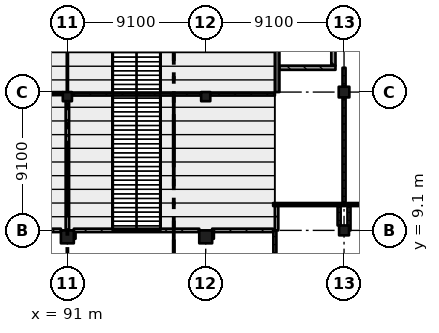
"""IFC4 building model, lengths in metres.
Left out: names, types, materials, properties, quantities, classifications, styles, units other than length and angle.
Written with IfcOpenShell. Run it as: python <this file> out.ifc"""

import sys

from ifc_helpers import new_model, si_unit, direction, frame, frame_2d, origin, origin_2d, place, context, subcontext, project, spatial, rectangle, extrude, element, fill, save


model = new_model("IFC4")
c1 = context("Model", 3, precision=1e-05, world=origin(), true_north=direction((0.0, 1.0)))
c2 = subcontext(c1, "Body", "Model", "MODEL_VIEW")
j1 = project(units=[si_unit("LENGTHUNIT", "METRE"), si_unit("PLANEANGLEUNIT", "RADIAN")], contexts=[c1])
p1 = place(None, origin())
s1 = spatial("IfcSite", under=j1, at=p1, CompositionType="ELEMENT")
p2 = place(p1, origin())
s2 = spatial("IfcBuilding", under=s1, at=p2, CompositionType="ELEMENT")
p3 = place(p2, frame((0.0, 0.0, 15.47)))
s3 = spatial("IfcBuildingStorey", under=s2, at=p3, CompositionType="ELEMENT", Elevation=15.47)
p4 = place(p3, frame((91.0, 8.675, 0.0), z_axis=(0.0, 0.0, 1.0), x_axis=(1.0, 0.0, 0.0)))
e1 = element("IfcColumn", 1, at=p4, inside=s3, PredefinedType="COLUMN", context=c2, shape_type="SweptSolid", body=[
    extrude(rectangle(XDim=0.85, YDim=0.85, at=origin_2d()), origin(), (0.0, 0.0, 1.0), 4.55),
])
p5 = place(p3, frame((91.0, 17.9, 0.0), z_axis=(0.0, 0.0, 1.0), x_axis=(1.0, 0.0, 0.0)))
e2 = element("IfcColumn", 2, at=p5, inside=s3, PredefinedType="COLUMN", context=c2, shape_type="SweptSolid", body=[
    extrude(rectangle(XDim=0.6, YDim=0.6, at=origin_2d()), origin(), (0.0, 0.0, 1.0), 2.71),
])
p6 = place(p3, frame((100.1, 8.675, 0.0), z_axis=(0.0, 0.0, 1.0), x_axis=(1.0, 0.0, 0.0)))
e3 = element("IfcColumn", 3, at=p6, inside=s3, PredefinedType="COLUMN", context=c2, shape_type="SweptSolid", body=[
    extrude(rectangle(XDim=0.85, YDim=0.85, at=origin_2d()), origin(), (0.0, 0.0, 1.0), 4.55),
])
p7 = place(p3, frame((100.1, 17.9, 0.0), z_axis=(0.0, 0.0, 1.0), x_axis=(1.0, 0.0, 0.0)))
e4 = element("IfcColumn", 4, at=p7, inside=s3, PredefinedType="COLUMN", context=c2, shape_type="SweptSolid", body=[
    extrude(rectangle(XDim=0.6, YDim=0.6, at=origin_2d()), origin(), (0.0, 0.0, 1.0), 2.71),
])
p8 = place(p3, frame((109.2, 9.1, 0.0), z_axis=(0.0, 0.0, 1.0), x_axis=(1.0, 0.0, 0.0)))
e5 = element("IfcColumn", 5, at=p8, inside=s3, PredefinedType="COLUMN", context=c2, shape_type="SweptSolid", body=[
    extrude(rectangle(XDim=0.65, YDim=0.65, at=origin_2d()), origin(), (0.0, 0.0, 1.0), 4.55),
])
p9 = place(p3, frame((109.2, 18.2, 0.0), z_axis=(0.0, 0.0, 1.0), x_axis=(1.0, 0.0, 0.0)))
e6 = element("IfcColumn", 6, at=p9, inside=s3, PredefinedType="COLUMN", context=c2, shape_type="SweptSolid", body=[
    extrude(rectangle(XDim=0.7, YDim=0.7, at=origin_2d()), origin(), (0.0, 0.0, 1.0), 4.55),
])
p10 = place(p3, frame((104.8, 40.95, 0.0), z_axis=(0.0, 0.0, 1.0), x_axis=(0.0, -1.0, 0.0)))
e7 = element("IfcWall", 7, at=p10, inside=s3, PredefinedType="SHEAR", context=c2, shape_type="SweptSolid", body=[
    extrude(rectangle(XDim=22.75, YDim=0.3, at=frame_2d((11.375, 0.0))), origin(), (0.0, 0.0, 1.0), 4.55),
])
p11 = place(p3, frame((82.325, 9.1, 0.0), z_axis=(0.0, 0.0, 1.0), x_axis=(1.0, 0.0, 0.0)))
e8 = element("IfcWall", 8, at=p11, inside=s3, PredefinedType="PARTITIONING", context=c2, shape_type="SweptSolid", body=[
    extrude(rectangle(XDim=8.25, YDim=0.225, at=frame_2d((4.125, 0.0))), origin(), (0.0, 0.0, 1.0), 3.6),
])
p12 = place(p11, frame((3.65, 0.0, 0.0)))
e9 = element("IfcOpeningElement", 9, at=p12, cuts=e8, PredefinedType="OPENING", context=c2, shape_type="SweptSolid", body=[
    extrude(rectangle(XDim=1.0, YDim=2.4, at=frame_2d((0.5, 1.2))), frame((0.0, 0.123, 0.0), z_axis=(0.0, -1.0, 0.0), x_axis=(1.0, 0.0, 0.0)), (0.0, 0.0, 1.0), 0.245),
])
p13 = place(p3, frame((91.0, 10.87, 0.0), z_axis=(0.0, 0.0, 1.0), x_axis=(0.0, -1.0, 0.0)))
e10 = element("IfcWall", 10, at=p13, inside=s3, PredefinedType="PARTITIONING", context=c2, shape_type="SweptSolid", body=[
    extrude(rectangle(XDim=1.77, YDim=0.225, at=frame_2d((0.885, 0.0))), origin(), (0.0, 0.0, 1.0), 3.22),
])
p14 = place(p3, frame((91.0, 17.6, 0.0), z_axis=(0.0, 0.0, 1.0), x_axis=(0.0, -1.0, 0.0)))
e11 = element("IfcWall", 11, at=p14, inside=s3, PredefinedType="PARTITIONING", context=c2, shape_type="SweptSolid", body=[
    extrude(rectangle(XDim=6.67, YDim=0.225, at=frame_2d((3.335, 0.0))), origin(), (0.0, 0.0, 1.0), 3.22),
])
p15 = place(p3, frame((91.425, 8.55, 0.0), z_axis=(0.0, 0.0, 1.0), x_axis=(0.0, 1.0, 0.0)))
e12 = element("IfcWall", 12, at=p15, inside=s3, PredefinedType="PARTITIONING", context=c2, shape_type="SweptSolid", body=[
    extrude(rectangle(XDim=0.425, YDim=0.225, at=frame_2d((0.212, 0.0))), origin(), (0.0, 0.0, 1.0), 4.3),
])
p16 = place(p3, frame((91.425, 9.1, 0.0), z_axis=(0.0, 0.0, 1.0), x_axis=(1.0, 0.0, 0.0)))
e13 = element("IfcWall", 13, at=p16, inside=s3, PredefinedType="PARTITIONING", context=c2, shape_type="SweptSolid", body=[
    extrude(rectangle(XDim=8.25, YDim=0.225, at=frame_2d((4.125, 0.0))), origin(), (0.0, 0.0, 1.0), 3.6),
])
p17 = place(p16, frame((3.65, 0.0, 0.0)))
e14 = element("IfcOpeningElement", 14, at=p17, cuts=e13, PredefinedType="OPENING", context=c2, shape_type="SweptSolid", body=[
    extrude(rectangle(XDim=1.0, YDim=2.4, at=frame_2d((0.5, 1.2))), frame((0.0, 0.123, 0.0), z_axis=(0.0, -1.0, 0.0), x_axis=(1.0, 0.0, 0.0)), (0.0, 0.0, 1.0), 0.245),
])
p18 = place(p3, frame((100.525, 8.55, 0.0), z_axis=(0.0, 0.0, 1.0), x_axis=(0.0, 1.0, 0.0)))
e15 = element("IfcWall", 15, at=p18, inside=s3, PredefinedType="PARTITIONING", context=c2, shape_type="SweptSolid", body=[
    extrude(rectangle(XDim=0.425, YDim=0.225, at=frame_2d((0.212, 0.0))), origin(), (0.0, 0.0, 1.0), 4.3),
])
p19 = place(p3, frame((100.525, 9.1, 0.0), z_axis=(0.0, 0.0, 1.0), x_axis=(1.0, 0.0, 0.0)))
e16 = element("IfcWall", 16, at=p19, inside=s3, PredefinedType="PARTITIONING", context=c2, shape_type="SweptSolid", body=[
    extrude(rectangle(XDim=4.013, YDim=0.225, at=frame_2d((2.006, 0.0))), origin(), (0.0, 0.0, 1.0), 3.6),
])
p20 = place(p3, frame((104.65, 5.5, 0.0), z_axis=(0.0, 0.0, 1.0), x_axis=(0.0, 1.0, 0.0)))
e17 = element("IfcWall", 17, at=p20, inside=s3, PredefinedType="PARTITIONING", context=c2, shape_type="SweptSolid", body=[
    extrude(rectangle(XDim=3.6, YDim=0.2, at=frame_2d((1.8, 0.0))), origin(), (0.0, 0.0, 1.0), 3.7),
])
p21 = place(p20, frame((0.55, 0.0, 0.0)))
e18 = element("IfcOpeningElement", 18, at=p21, cuts=e17, PredefinedType="OPENING", context=c2, shape_type="SweptSolid", body=[
    extrude(rectangle(XDim=2.4, YDim=2.4, at=frame_2d((1.2, 1.2))), frame((0.0, 0.11, 0.0), z_axis=(0.0, -1.0, 0.0), x_axis=(1.0, 0.0, 0.0)), (0.0, 0.0, 1.0), 0.22),
])
p22 = place(p3, frame((104.763, 9.1, 0.0), z_axis=(0.0, 0.0, 1.0), x_axis=(0.0, 1.0, 0.0)))
e19 = element("IfcWall", 19, at=p22, inside=s3, PredefinedType="PARTITIONING", context=c2, shape_type="SweptSolid", body=[
    extrude(rectangle(XDim=1.6, YDim=0.225, at=frame_2d((0.8, 0.0))), origin(), (0.0, 0.0, 1.0), 4.3),
])
p23 = place(p3, frame((104.95, 19.8, 0.0), z_axis=(0.0, 0.0, 1.0), x_axis=(1.0, 0.0, 0.0)))
e20 = element("IfcWall", 20, at=p23, inside=s3, PredefinedType="SOLIDWALL", context=c2, shape_type="SweptSolid", body=[
    extrude(rectangle(XDim=3.688, YDim=0.275, at=frame_2d((1.844, 0.0))), origin(), (0.0, 0.0, 1.0), 4.3),
])
p24 = place(p23, frame((1.25, 0.0, 0.0)))
e21 = element("IfcOpeningElement", 21, at=p24, cuts=e20, PredefinedType="OPENING", context=c2, shape_type="SweptSolid", body=[
    extrude(rectangle(XDim=1.2, YDim=2.4, at=frame_2d((0.6, 1.2))), frame((0.0, 0.147, 0.0), z_axis=(0.0, -1.0, 0.0), x_axis=(1.0, 0.0, 0.0)), (0.0, 0.0, 1.0), 0.295),
])
p25 = place(p3, frame((108.5, 19.938, 0.0), z_axis=(0.0, 0.0, 1.0), x_axis=(0.0, 1.0, 0.0)))
e22 = element("IfcWall", 22, at=p25, inside=s3, PredefinedType="SOLIDWALL", context=c2, shape_type="SweptSolid", body=[
    extrude(rectangle(XDim=6.9, YDim=0.275, at=frame_2d((3.45, 0.0))), origin(), (0.0, 0.0, 1.0), 4.3),
])
p26 = place(p3, frame((108.875, 9.425, 0.0), z_axis=(0.0, 0.0, 1.0), x_axis=(0.0, 1.0, 0.0)))
e23 = element("IfcWall", 23, at=p26, inside=s3, PredefinedType="PARTITIONING", context=c2, shape_type="SweptSolid", body=[
    extrude(rectangle(XDim=1.275, YDim=0.2, at=frame_2d((0.637, 0.0))), origin(), (0.0, 0.0, 1.0), 4.3),
])
p27 = place(p3, frame((104.538, 10.8, 0.0), z_axis=(0.0, 0.0, 1.0), x_axis=(1.0, 0.0, 0.0)))
e24 = element("IfcWall", 24, at=p27, inside=s3, PredefinedType="PARTITIONING", context=c2, shape_type="SweptSolid", body=[
    extrude(rectangle(XDim=4.762, YDim=0.2, at=frame_2d((2.381, 0.0))), origin(), (0.0, 0.0, 1.0), 4.3),
])
p28 = place(p27, frame((1.288, 0.0, 0.0)))
e25 = element("IfcOpeningElement", 25, at=p28, cuts=e24, PredefinedType="OPENING", context=c2, shape_type="SweptSolid", body=[
    extrude(rectangle(XDim=1.8, YDim=2.4, at=frame_2d((0.9, 1.2))), frame((0.0, 0.11, 0.0), z_axis=(0.0, -1.0, 0.0), x_axis=(1.0, 0.0, 0.0)), (0.0, 0.0, 1.0), 0.22),
])
p29 = place(p3, frame((109.2, 10.9, 0.0), z_axis=(0.0, 0.0, 1.0), x_axis=(0.0, 1.0, 0.0)))
e26 = element("IfcWall", 26, at=p29, inside=s3, PredefinedType="PARTITIONING", context=c2, shape_type="SweptSolid", body=[
    extrude(rectangle(XDim=6.95, YDim=0.2, at=frame_2d((3.475, 0.0))), origin(), (0.0, 0.0, 1.0), 3.55),
])
p30 = place(p29, frame((0.85, 0.0, 0.0)))
e27 = element("IfcOpeningElement", 27, at=p30, cuts=e26, PredefinedType="OPENING", context=c2, shape_type="SweptSolid", body=[
    extrude(rectangle(XDim=1.8, YDim=2.4, at=frame_2d((0.9, 1.2))), frame((0.0, 0.11, 0.0), z_axis=(0.0, -1.0, 0.0), x_axis=(1.0, 0.0, 0.0)), (0.0, 0.0, 1.0), 0.22),
])
p31 = place(p29, frame((4.35, 0.0, 0.0)))
e28 = element("IfcOpeningElement", 28, at=p31, cuts=e26, PredefinedType="OPENING", context=c2, shape_type="SweptSolid", body=[
    extrude(rectangle(XDim=1.8, YDim=2.4, at=frame_2d((0.9, 1.2))), frame((0.0, 0.11, 0.0), z_axis=(0.0, -1.0, 0.0), x_axis=(1.0, 0.0, 0.0)), (0.0, 0.0, 1.0), 0.22),
])
p32 = place(p3, frame((109.2, 18.55, 0.0), z_axis=(0.0, 0.0, 1.0), x_axis=(0.0, 1.0, 0.0)))
e29 = element("IfcWall", 29, at=p32, inside=s3, PredefinedType="PARTITIONING", context=c2, shape_type="SweptSolid", body=[
    extrude(rectangle(XDim=1.25, YDim=0.2, at=frame_2d((0.625, 0.0))), origin(), (0.0, 0.0, 1.0), 3.55),
])
p33 = place(p3, frame((109.525, 9.1, 0.0), z_axis=(0.0, 0.0, 1.0), x_axis=(0.0, 1.0, 0.0)))
e30 = element("IfcWall", 30, at=p33, inside=s3, PredefinedType="PARTITIONING", context=c2, shape_type="SweptSolid", body=[
    extrude(rectangle(XDim=1.6, YDim=0.2, at=frame_2d((0.8, 0.0))), origin(), (0.0, 0.0, 1.0), 4.3),
])
p34 = place(p3, frame((112.17, 10.8, 0.0), z_axis=(0.0, 0.0, 1.0), x_axis=(-1.0, 0.0, 0.0)))
e31 = element("IfcWall", 31, at=p34, inside=s3, PredefinedType="PARTITIONING", context=c2, shape_type="SweptSolid", body=[
    extrude(rectangle(XDim=2.745, YDim=0.2, at=frame_2d((1.373, 0.0))), origin(), (0.0, 0.0, 1.0), 4.3),
])
p35 = place(p34, frame((0.45, 0.0, 0.0)))
e32 = element("IfcOpeningElement", 32, at=p35, cuts=e31, PredefinedType="OPENING", context=c2, shape_type="SweptSolid", body=[
    extrude(rectangle(XDim=1.8, YDim=2.4, at=frame_2d((0.9, 1.2))), frame((0.0, 0.11, 0.0), z_axis=(0.0, -1.0, 0.0), x_axis=(1.0, 0.0, 0.0)), (0.0, 0.0, 1.0), 0.22),
])
p36 = place(p3, frame((82.2, 18.071, 0.0), z_axis=(0.0, 0.0, 1.0), x_axis=(0.999994544879, 0.003303061025, 0.0)))
e33 = element("IfcWall", 33, at=p36, inside=s3, PredefinedType="PARTITIONING", context=c2, shape_type="SweptSolid", body=[
    extrude(rectangle(XDim=8.5, YDim=0.2, at=frame_2d((4.25, 0.0))), origin(), (0.0, 0.0, 1.0), 2.71),
])
p37 = place(p36, frame((1.25, 0.0, 1.1)))
e34 = element("IfcOpeningElement", 34, at=p37, cuts=e33, PredefinedType="OPENING", context=c2, shape_type="SweptSolid", body=[
    extrude(rectangle(XDim=6.0, YDim=1.3, at=frame_2d((3.0, 0.65))), frame((0.0, 0.11, 0.0), z_axis=(0.0, -1.0, 0.0), x_axis=(1.0, 0.0, 0.0)), (0.0, 0.0, 1.0), 0.22),
])
p38 = place(p3, frame((91.3, 18.07, 0.0), z_axis=(0.0, 0.0, 1.0), x_axis=(1.0, 0.0, 0.0)))
e35 = element("IfcWall", 35, at=p38, inside=s3, PredefinedType="PARTITIONING", context=c2, shape_type="SweptSolid", body=[
    extrude(rectangle(XDim=8.5, YDim=0.2, at=frame_2d((4.25, 0.0))), origin(), (0.0, 0.0, 1.0), 2.71),
])
p39 = place(p38, frame((1.25, 0.0, 1.1)))
e36 = element("IfcOpeningElement", 36, at=p39, cuts=e35, PredefinedType="OPENING", context=c2, shape_type="SweptSolid", body=[
    extrude(rectangle(XDim=6.0, YDim=1.3, at=frame_2d((3.0, 0.65))), frame((0.0, 0.11, 0.0), z_axis=(0.0, -1.0, 0.0), x_axis=(1.0, 0.0, 0.0)), (0.0, 0.0, 1.0), 0.22),
])
p40 = place(p3, frame((100.4, 18.07, 0.0), z_axis=(0.0, 0.0, 1.0), x_axis=(1.0, 0.0, 0.0)))
e37 = element("IfcWall", 37, at=p40, inside=s3, PredefinedType="PARTITIONING", context=c2, shape_type="SweptSolid", body=[
    extrude(rectangle(XDim=4.25, YDim=0.2, at=frame_2d((2.125, 0.0))), origin(), (0.0, 0.0, 1.0), 2.91),
])
p41 = place(p40, frame((1.125, 0.0, 1.1)))
e38 = element("IfcOpeningElement", 38, at=p41, cuts=e37, PredefinedType="OPENING", context=c2, shape_type="SweptSolid", body=[
    extrude(rectangle(XDim=2.0, YDim=1.3, at=frame_2d((1.0, 0.65))), frame((0.0, 0.11, 0.0), z_axis=(0.0, -1.0, 0.0), x_axis=(1.0, 0.0, 0.0)), (0.0, 0.0, 1.0), 0.22),
])
p42 = place(p39, origin())
e39 = element("IfcWindow", 39, at=p42, inside=s3, PartitioningType="SINGLE_PANEL", PredefinedType="WINDOW", context=c2, shape_type="SweptSolid", body=[
    extrude(rectangle(XDim=6.0, YDim=1.3, at=frame_2d((3.0, 0.65))), frame((0.0, 0.03, 0.0), z_axis=(0.0, -1.0, 0.0), x_axis=(1.0, 0.0, 0.0)), (0.0, 0.0, 1.0), 0.06),
])
fill(e36, e39)
p43 = place(p41, origin())
e40 = element("IfcWindow", 40, at=p43, inside=s3, PartitioningType="SINGLE_PANEL", PredefinedType="WINDOW", context=c2, shape_type="SweptSolid", body=[
    extrude(rectangle(XDim=2.0, YDim=1.3, at=frame_2d((1.0, 0.65))), frame((0.0, 0.03, 0.0), z_axis=(0.0, -1.0, 0.0), x_axis=(1.0, 0.0, 0.0)), (0.0, 0.0, 1.0), 0.06),
])
fill(e38, e40)
p44 = place(p24, origin())
e41 = element("IfcDoor", 41, at=p44, inside=s3, OperationType="SINGLE_SWING_LEFT", PredefinedType="DOOR", context=c2, shape_type="SweptSolid", body=[
    extrude(rectangle(XDim=1.2, YDim=2.4, at=frame_2d((0.6, 1.2))), frame((0.0, 0.025, 0.0), z_axis=(0.0, -1.0, 0.0), x_axis=(1.0, 0.0, 0.0)), (0.0, 0.0, 1.0), 0.05),
])
fill(e21, e41)
p45 = place(p17, origin())
e42 = element("IfcDoor", 42, at=p45, inside=s3, OperationType="SINGLE_SWING_LEFT", PredefinedType="DOOR", context=c2, shape_type="SweptSolid", body=[
    extrude(rectangle(XDim=1.0, YDim=2.4, at=frame_2d((0.5, 1.2))), frame((0.0, 0.025, 0.0), z_axis=(0.0, -1.0, 0.0), x_axis=(1.0, 0.0, 0.0)), (0.0, 0.0, 1.0), 0.05),
])
fill(e14, e42)
p46 = place(p30, origin())
e43 = element("IfcDoor", 43, at=p46, inside=s3, OperationType="DOUBLE_DOOR_SINGLE_SWING", PredefinedType="DOOR", context=c2, shape_type="SweptSolid", body=[
    extrude(rectangle(XDim=1.8, YDim=2.4, at=frame_2d((0.9, 1.2))), frame((0.0, 0.025, 0.0), z_axis=(0.0, -1.0, 0.0), x_axis=(1.0, 0.0, 0.0)), (0.0, 0.0, 1.0), 0.05),
])
fill(e27, e43)
p47 = place(p31, origin())
e44 = element("IfcDoor", 44, at=p47, inside=s3, OperationType="DOUBLE_DOOR_SINGLE_SWING", PredefinedType="DOOR", context=c2, shape_type="SweptSolid", body=[
    extrude(rectangle(XDim=1.8, YDim=2.4, at=frame_2d((0.9, 1.2))), frame((0.0, 0.025, 0.0), z_axis=(0.0, -1.0, 0.0), x_axis=(1.0, 0.0, 0.0)), (0.0, 0.0, 1.0), 0.05),
])
fill(e28, e44)
p48 = place(p35, origin())
e45 = element("IfcDoor", 45, at=p48, inside=s3, OperationType="DOUBLE_DOOR_SINGLE_SWING", PredefinedType="DOOR", context=c2, shape_type="SweptSolid", body=[
    extrude(rectangle(XDim=1.8, YDim=2.4, at=frame_2d((0.9, 1.2))), frame((0.0, 0.025, 0.0), z_axis=(0.0, -1.0, 0.0), x_axis=(1.0, 0.0, 0.0)), (0.0, 0.0, 1.0), 0.05),
])
fill(e32, e45)
p49 = place(p28, origin())
e46 = element("IfcDoor", 46, at=p49, inside=s3, OperationType="DOUBLE_DOOR_SINGLE_SWING", PredefinedType="DOOR", context=c2, shape_type="SweptSolid", body=[
    extrude(rectangle(XDim=1.8, YDim=2.4, at=frame_2d((0.9, 1.2))), frame((0.0, 0.025, 0.0), z_axis=(0.0, -1.0, 0.0), x_axis=(1.0, 0.0, 0.0)), (0.0, 0.0, 1.0), 0.05),
])
fill(e25, e46)
p50 = place(p21, origin())
e47 = element("IfcDoor", 47, at=p50, inside=s3, OperationType="DOUBLE_DOOR_SINGLE_SWING", PredefinedType="DOOR", context=c2, shape_type="SweptSolid", body=[
    extrude(rectangle(XDim=2.4, YDim=2.4, at=frame_2d((1.2, 1.2))), frame((0.0, 0.025, 0.0), z_axis=(0.0, -1.0, 0.0), x_axis=(1.0, 0.0, 0.0)), (0.0, 0.0, 1.0), 0.05),
])
fill(e18, e47)
save(model, sys.argv[1])
